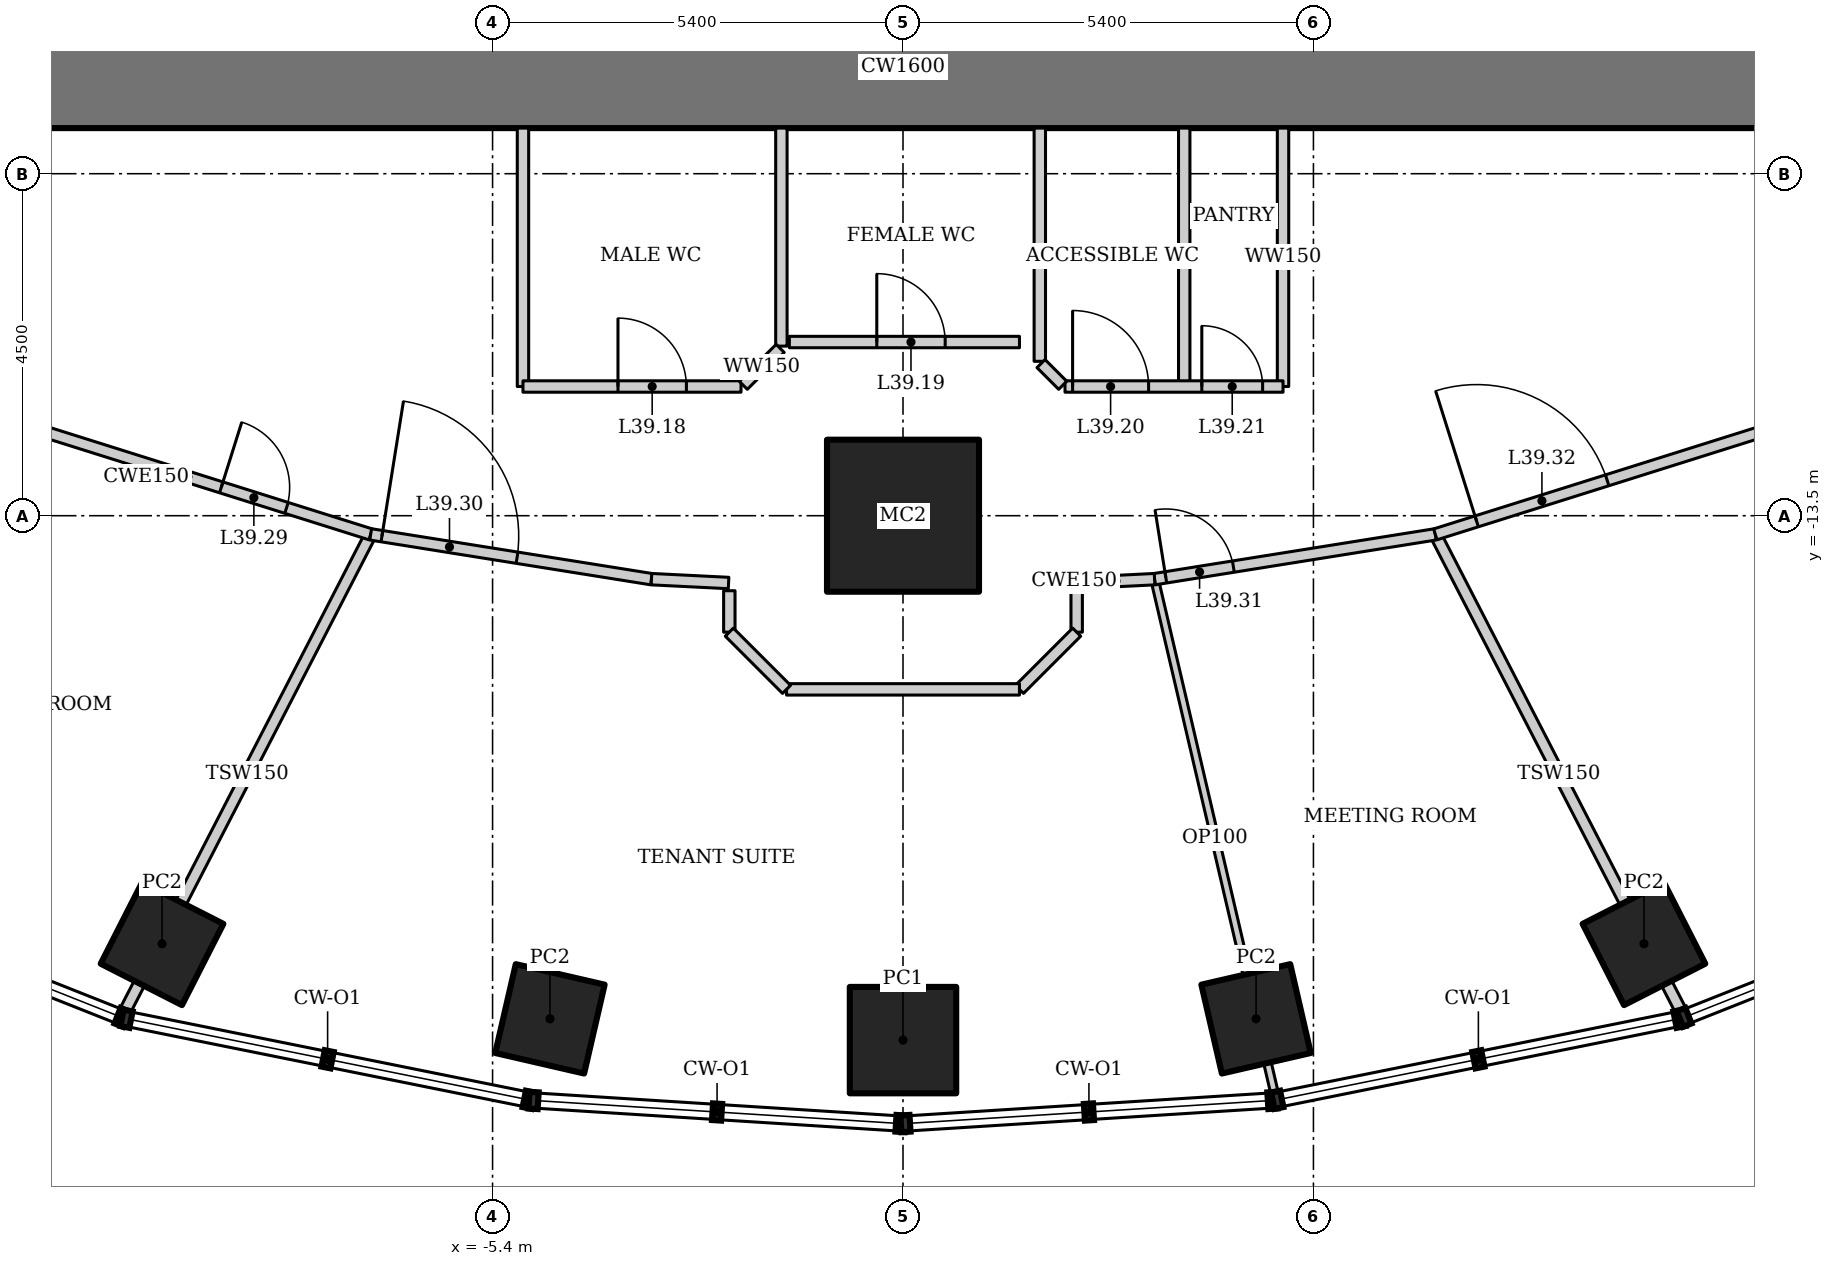
"""IFC4 building model, lengths in metres.
Left out: names, types, materials, properties, quantities, classifications, styles, units other than length and angle.
Written with IfcOpenShell. Run it as: python <this file> out.ifc"""

import sys

from ifc_helpers import new_model, si_unit, direction, frame, frame_2d, origin, origin_2d, place, context, subcontext, project, spatial, rectangle, hollow_rectangle, extrude, element, fill, save


model = new_model("IFC4")
c1 = context("Model", 3, precision=1e-05, world=origin(), true_north=direction((0.0, 1.0)))
c2 = subcontext(c1, "Body", "Model", "MODEL_VIEW")
j1 = project(units=[si_unit("LENGTHUNIT", "METRE"), si_unit("PLANEANGLEUNIT", "RADIAN")], contexts=[c1])
p1 = place(None, origin())
s1 = spatial("IfcSite", under=j1, at=p1, CompositionType="ELEMENT")
p2 = place(p1, origin())
s2 = spatial("IfcBuilding", under=s1, at=p2, CompositionType="ELEMENT")
p3 = place(p2, frame((0.0, 0.0, 167.8)))
s3 = spatial("IfcBuildingStorey", under=s2, at=p3, CompositionType="ELEMENT", Elevation=167.8)
p4 = place(p3, frame((0.0, -13.5, 0.0), z_axis=(0.0, 0.0, 1.0), x_axis=(1.0, 0.0, 0.0)))
e1 = element("IfcColumn", 1, at=p4, inside=s3, PredefinedType="COLUMN", context=c2, shape_type="SweptSolid", body=[
    extrude(hollow_rectangle(XDim=2.0, YDim=2.0, WallThickness=0.17, at=origin_2d()), origin(), (0.0, 0.0, 1.0), 4.2),
])
for number, where, z_axis, x_axis in (
    (2, (-9.749, -19.133, 0.0), (0.0, 0.0, 1.0), (0.454, 0.891, 0.0)),
    (3, (-4.645, -20.12, 0.0), (0.0, 0.0, 1.0), (0.225, 0.974, 0.0)),
):
    element("IfcColumn", number, at=place(p3, frame(where, z_axis=z_axis, x_axis=x_axis)), inside=s3, PredefinedType="COLUMN", context=c2, shape_type="SweptSolid", body=[
        extrude(hollow_rectangle(XDim=1.2, YDim=1.2, WallThickness=0.1, at=origin_2d()), origin(), (0.0, 0.0, 1.0), 4.2),
    ])
p5 = place(p3, frame((0.0, -20.4, 0.0), z_axis=(0.0, 0.0, 1.0), x_axis=(1.0, 0.0, 0.0)))
e4 = element("IfcColumn", 4, at=p5, inside=s3, PredefinedType="COLUMN", context=c2, shape_type="SweptSolid", body=[
    extrude(hollow_rectangle(XDim=1.4, YDim=1.4, WallThickness=0.1, at=origin_2d()), origin(), (0.0, 0.0, 1.0), 4.2),
])
for number, where, z_axis, x_axis in (
    (5, (4.645, -20.12, 0.0), (0.0, 0.0, 1.0), (0.974, 0.225, 0.0)),
    (6, (9.749, -19.133, 0.0), (0.0, 0.0, 1.0), (0.891, 0.454, 0.0)),
):
    element("IfcColumn", number, at=place(p3, frame(where, z_axis=z_axis, x_axis=x_axis)), inside=s3, PredefinedType="COLUMN", context=c2, shape_type="SweptSolid", body=[
        extrude(hollow_rectangle(XDim=1.2, YDim=1.2, WallThickness=0.1, at=origin_2d()), origin(), (0.0, 0.0, 1.0), 4.2),
    ])
p6 = place(p3, frame((-12.2, -7.6, 0.0), z_axis=(0.0, 0.0, 1.0), x_axis=(1.0, 0.0, 0.0)))
e7 = element("IfcWall", 7, at=p6, inside=s3, PredefinedType="SHEAR", context=c2, shape_type="SweptSolid", body=[
    extrude(rectangle(XDim=24.4, YDim=1.6, at=frame_2d((12.2, 0.0))), origin(), (0.0, 0.0, 1.0), 4.2),
])
p7 = place(p3, frame((-10.253, -20.052, 0.0), z_axis=(0.0, 0.0, 1.0), x_axis=(0.458082677592, 0.888909590729, 0.0)))
e8 = element("IfcWall", 8, at=p7, inside=s3, PredefinedType="PARTITIONING", context=c2, shape_type="SweptSolid", body=[
    extrude(rectangle(XDim=7.094, YDim=0.15, at=frame_2d((3.547, 0.0))), origin(), (0.0, 0.0, 1.0), 3.349),
])
p8 = place(p3, frame((4.897, -21.135, 0.0), z_axis=(0.0, 0.0, 1.0), x_axis=(-0.22733572198, 0.973816445493, 0.0)))
e9 = element("IfcWall", 9, at=p8, inside=s3, PredefinedType="PARTITIONING", context=c2, shape_type="SweptSolid", body=[
    extrude(rectangle(XDim=6.983, YDim=0.1, at=frame_2d((3.491, 0.0))), origin(), (0.0, 0.0, 1.0), 3.293),
])
p9 = place(p3, frame((10.253, -20.052, 0.0), z_axis=(0.0, 0.0, 1.0), x_axis=(-0.458082677592, 0.888909590729, 0.0)))
e10 = element("IfcWall", 10, at=p9, inside=s3, PredefinedType="PARTITIONING", context=c2, shape_type="SweptSolid", body=[
    extrude(rectangle(XDim=7.094, YDim=0.15, at=frame_2d((3.547, 0.0))), origin(), (0.0, 0.0, 1.0), 3.349),
])
p10 = place(p3, frame((-11.813, -12.232, 0.0), z_axis=(0.0, 0.0, 1.0), x_axis=(0.953893934057, -0.300143903101, 0.0)))
e11 = element("IfcWall", 11, at=p10, inside=s3, PredefinedType="PARTITIONING", context=c2, shape_type="SweptSolid", body=[
    extrude(rectangle(XDim=5.042, YDim=0.15, at=frame_2d((2.521, 0.0))), origin(), (0.0, 0.0, 1.0), 4.05),
])
p11 = place(p10, frame((2.98, 0.0, 0.0)))
e12 = element("IfcOpeningElement", 12, at=p11, cuts=e11, PredefinedType="OPENING", context=c2, shape_type="SweptSolid", body=[
    extrude(rectangle(XDim=0.9, YDim=2.1, at=frame_2d((0.45, 1.05))), frame((0.0, 0.085, 0.0), z_axis=(0.0, -1.0, 0.0), x_axis=(1.0, 0.0, 0.0)), (0.0, 0.0, 1.0), 0.17),
])
p12 = place(p3, frame((-7.004, -13.746, 0.0), z_axis=(0.0, 0.0, 1.0), x_axis=(0.987511396594, -0.157547585181, 0.0)))
e13 = element("IfcWall", 13, at=p12, inside=s3, PredefinedType="PARTITIONING", context=c2, shape_type="SweptSolid", body=[
    extrude(rectangle(XDim=3.741, YDim=0.15, at=frame_2d((1.87, 0.0))), origin(), (0.0, 0.0, 1.0), 4.05),
])
p13 = place(p12, frame((0.15, 0.0, 0.0)))
e14 = element("IfcOpeningElement", 14, at=p13, cuts=e13, PredefinedType="OPENING", context=c2, shape_type="SweptSolid", body=[
    extrude(rectangle(XDim=1.8, YDim=2.1, at=frame_2d((0.9, 1.05))), frame((0.0, 0.085, 0.0), z_axis=(0.0, -1.0, 0.0), x_axis=(1.0, 0.0, 0.0)), (0.0, 0.0, 1.0), 0.17),
])
p14 = place(p3, frame((3.31, -14.335, 0.0), z_axis=(0.0, 0.0, 1.0), x_axis=(0.987511396594, 0.157547585181, 0.0)))
e15 = element("IfcWall", 15, at=p14, inside=s3, PredefinedType="PARTITIONING", context=c2, shape_type="SweptSolid", body=[
    extrude(rectangle(XDim=3.741, YDim=0.15, at=frame_2d((1.87, 0.0))), origin(), (0.0, 0.0, 1.0), 4.05),
])
p15 = place(p14, frame((0.15, 0.0, 0.0)))
e16 = element("IfcOpeningElement", 16, at=p15, cuts=e15, PredefinedType="OPENING", context=c2, shape_type="SweptSolid", body=[
    extrude(rectangle(XDim=0.9, YDim=2.1, at=frame_2d((0.45, 1.05))), frame((0.0, 0.085, 0.0), z_axis=(0.0, -1.0, 0.0), x_axis=(1.0, 0.0, 0.0)), (0.0, 0.0, 1.0), 0.17),
])
p16 = place(p3, frame((7.004, -13.746, 0.0), z_axis=(0.0, 0.0, 1.0), x_axis=(0.953893934057, 0.300143903101, 0.0)))
e17 = element("IfcWall", 17, at=p16, inside=s3, PredefinedType="PARTITIONING", context=c2, shape_type="SweptSolid", body=[
    extrude(rectangle(XDim=5.042, YDim=0.15, at=frame_2d((2.521, 0.0))), origin(), (0.0, 0.0, 1.0), 4.05),
])
p17 = place(p16, frame((0.57, 0.0, 0.0)))
e18 = element("IfcOpeningElement", 18, at=p17, cuts=e17, PredefinedType="OPENING", context=c2, shape_type="SweptSolid", body=[
    extrude(rectangle(XDim=1.8, YDim=2.1, at=frame_2d((0.9, 1.05))), frame((0.0, 0.085, 0.0), z_axis=(0.0, -1.0, 0.0), x_axis=(1.0, 0.0, 0.0)), (0.0, 0.0, 1.0), 0.17),
])
for number, where, z_axis, x_axis in (
    (19, (-5.0, -8.4, 0.0), (0.0, 0.0, 1.0), (0.0, -1.0, 0.0)),
    (20, (5.0, -8.4, 0.0), (0.0, 0.0, 1.0), (0.0, -1.0, 0.0)),
    (21, (3.7, -8.4, 0.0), (0.0, 0.0, 1.0), (0.0, -1.0, 0.0)),
):
    element("IfcWall", number, at=place(p3, frame(where, z_axis=z_axis, x_axis=x_axis)), inside=s3, PredefinedType="SOLIDWALL", context=c2, shape_type="SweptSolid", body=[
        extrude(rectangle(XDim=3.4, YDim=0.15, at=frame_2d((1.7, 0.0))), origin(), (0.0, 0.0, 1.0), 4.05),
    ])
for number, where, z_axis, x_axis in (
    (22, (-3.31, -14.335, 0.0), (0.0, 0.0, 1.0), (0.999, -0.05, 0.0)),
    (23, (2.295, -14.385, 0.0), (0.0, 0.0, 1.0), (0.999, 0.05, 0.0)),
):
    element("IfcWall", number, at=place(p3, frame(where, z_axis=z_axis, x_axis=x_axis)), inside=s3, PredefinedType="PARTITIONING", context=c2, shape_type="SweptSolid", body=[
        extrude(rectangle(XDim=1.016, YDim=0.15, at=frame_2d((0.508, 0.0))), origin(), (0.0, 0.0, 1.0), 4.05),
    ])
p18 = place(p3, frame((-5.0, -11.8, 0.0), z_axis=(0.0, 0.0, 1.0), x_axis=(1.0, 0.0, 0.0)))
e24 = element("IfcWall", 24, at=p18, inside=s3, PredefinedType="SOLIDWALL", context=c2, shape_type="SweptSolid", body=[
    extrude(rectangle(XDim=2.869, YDim=0.15, at=frame_2d((1.434, 0.0))), origin(), (0.0, 0.0, 1.0), 4.05),
])
p19 = place(p18, frame((1.25, 0.0, 0.0)))
e25 = element("IfcOpeningElement", 25, at=p19, cuts=e24, PredefinedType="OPENING", context=c2, shape_type="SweptSolid", body=[
    extrude(rectangle(XDim=0.9, YDim=2.1, at=frame_2d((0.45, 1.05))), frame((0.0, 0.085, 0.0), z_axis=(0.0, -1.0, 0.0), x_axis=(1.0, 0.0, 0.0)), (0.0, 0.0, 1.0), 0.17),
])
p20 = place(p3, frame((2.131, -11.8, 0.0), z_axis=(0.0, 0.0, 1.0), x_axis=(1.0, 0.0, 0.0)))
e26 = element("IfcWall", 26, at=p20, inside=s3, PredefinedType="SOLIDWALL", context=c2, shape_type="SweptSolid", body=[
    extrude(rectangle(XDim=2.869, YDim=0.15, at=frame_2d((1.434, 0.0))), origin(), (0.0, 0.0, 1.0), 4.05),
])
p21 = place(p20, frame((0.1, 0.0, 0.0)))
e27 = element("IfcOpeningElement", 27, at=p21, cuts=e26, PredefinedType="OPENING", context=c2, shape_type="SweptSolid", body=[
    extrude(rectangle(XDim=1.0, YDim=2.1, at=frame_2d((0.5, 1.05))), frame((0.0, 0.085, 0.0), z_axis=(0.0, -1.0, 0.0), x_axis=(1.0, 0.0, 0.0)), (0.0, 0.0, 1.0), 0.17),
])
p22 = place(p20, frame((1.8, 0.0, 0.0)))
e28 = element("IfcOpeningElement", 28, at=p22, cuts=e26, PredefinedType="OPENING", context=c2, shape_type="SweptSolid", body=[
    extrude(rectangle(XDim=0.8, YDim=2.1, at=frame_2d((0.4, 1.05))), frame((0.0, 0.085, 0.0), z_axis=(0.0, -1.0, 0.0), x_axis=(1.0, 0.0, 0.0)), (0.0, 0.0, 1.0), 0.17),
])
p23 = place(p3, frame((-1.6, -8.4, 0.0), z_axis=(0.0, 0.0, 1.0), x_axis=(0.0, -1.0, 0.0)))
e29 = element("IfcWall", 29, at=p23, inside=s3, PredefinedType="SOLIDWALL", context=c2, shape_type="SweptSolid", body=[
    extrude(rectangle(XDim=2.869, YDim=0.15, at=frame_2d((1.434, 0.0))), origin(), (0.0, 0.0, 1.0), 4.05),
])
p24 = place(p3, frame((1.8, -8.4, 0.0), z_axis=(0.0, 0.0, 1.0), x_axis=(0.0, -1.0, 0.0)))
e30 = element("IfcWall", 30, at=p24, inside=s3, PredefinedType="SOLIDWALL", context=c2, shape_type="SweptSolid", body=[
    extrude(rectangle(XDim=3.069, YDim=0.15, at=frame_2d((1.534, 0.0))), origin(), (0.0, 0.0, 1.0), 4.05),
])
p25 = place(p3, frame((-2.101, -11.784, 0.0), z_axis=(0.0, 0.0, 1.0), x_axis=(0.706928959799, 0.707284557867, 0.0)))
e31 = element("IfcWall", 31, at=p25, inside=s3, PredefinedType="SOLIDWALL", context=c2, shape_type="SweptSolid", body=[
    extrude(rectangle(XDim=0.687, YDim=0.15, at=frame_2d((0.343, 0.0))), origin(), (0.0, 0.0, 1.0), 4.05),
])
p26 = place(p3, frame((-1.495, -11.215, 0.0), z_axis=(0.0, 0.0, 1.0), x_axis=(1.0, 0.0, 0.0)))
e32 = element("IfcWall", 32, at=p26, inside=s3, PredefinedType="SOLIDWALL", context=c2, shape_type="SweptSolid", body=[
    extrude(rectangle(XDim=3.027, YDim=0.15, at=frame_2d((1.514, 0.0))), origin(), (0.0, 0.0, 1.0), 4.05),
])
p27 = place(p26, frame((1.15, 0.0, 0.0)))
e33 = element("IfcOpeningElement", 33, at=p27, cuts=e32, PredefinedType="OPENING", context=c2, shape_type="SweptSolid", body=[
    extrude(rectangle(XDim=0.9, YDim=2.1, at=frame_2d((0.45, 1.05))), frame((0.0, 0.085, 0.0), z_axis=(0.0, -1.0, 0.0), x_axis=(1.0, 0.0, 0.0)), (0.0, 0.0, 1.0), 0.17),
])
p28 = place(p3, frame((1.816, -11.499, 0.0), z_axis=(0.0, 0.0, 1.0), x_axis=(0.706804405012, -0.707409028113, 0.0)))
e34 = element("IfcWall", 34, at=p28, inside=s3, PredefinedType="SOLIDWALL", context=c2, shape_type="SweptSolid", body=[
    extrude(rectangle(XDim=0.404, YDim=0.15, at=frame_2d((0.202, 0.0))), origin(), (0.0, 0.0, 1.0), 4.05),
])
for number, where, z_axis, x_axis in (
    (35, (-2.285, -15.032, 0.0), (0.0, 0.0, 1.0), (0.0, 1.0, 0.0)),
    (36, (2.285, -14.487, 0.0), (0.0, 0.0, 1.0), (0.0, -1.0, 0.0)),
):
    element("IfcWall", number, at=place(p3, frame(where, z_axis=z_axis, x_axis=x_axis)), inside=s3, PredefinedType="PARTITIONING", context=c2, shape_type="SweptSolid", body=[
        extrude(rectangle(XDim=0.545, YDim=0.15, at=frame_2d((0.272, 0.0))), origin(), (0.0, 0.0, 1.0), 4.05),
    ])
p29 = place(p3, frame((2.285, -15.032, 0.0), z_axis=(0.0, 0.0, 1.0), x_axis=(-0.707106781187, -0.707106781187, 0.0)))
e37 = element("IfcWall", 37, at=p29, inside=s3, PredefinedType="PARTITIONING", context=c2, shape_type="SweptSolid", body=[
    extrude(rectangle(XDim=1.064, YDim=0.15, at=frame_2d((0.532, 0.0))), origin(), (0.0, 0.0, 1.0), 4.05),
])
p30 = place(p3, frame((1.532, -15.785, 0.0), z_axis=(0.0, 0.0, 1.0), x_axis=(-1.0, 0.0, 0.0)))
e38 = element("IfcWall", 38, at=p30, inside=s3, PredefinedType="PARTITIONING", context=c2, shape_type="SweptSolid", body=[
    extrude(rectangle(XDim=3.064, YDim=0.15, at=frame_2d((1.532, 0.0))), origin(), (0.0, 0.0, 1.0), 4.05),
])
p31 = place(p3, frame((-1.532, -15.785, 0.0), z_axis=(0.0, 0.0, 1.0), x_axis=(-0.707106781187, 0.707106781187, 0.0)))
e39 = element("IfcWall", 39, at=p31, inside=s3, PredefinedType="PARTITIONING", context=c2, shape_type="SweptSolid", body=[
    extrude(rectangle(XDim=1.064, YDim=0.15, at=frame_2d((0.532, 0.0))), origin(), (0.0, 0.0, 1.0), 4.05),
])
p32 = place(p19, origin())
e40 = element("IfcDoor", 40, at=p32, inside=s3, OperationType="SINGLE_SWING_LEFT", PredefinedType="DOOR", context=c2, shape_type="SweptSolid", body=[
    extrude(rectangle(XDim=0.9, YDim=2.1, at=frame_2d((0.45, 1.05))), frame((0.0, 0.025, 0.0), z_axis=(0.0, -1.0, 0.0), x_axis=(1.0, 0.0, 0.0)), (0.0, 0.0, 1.0), 0.05),
])
fill(e25, e40)
p33 = place(p27, origin())
e41 = element("IfcDoor", 41, at=p33, inside=s3, OperationType="SINGLE_SWING_LEFT", PredefinedType="DOOR", context=c2, shape_type="SweptSolid", body=[
    extrude(rectangle(XDim=0.9, YDim=2.1, at=frame_2d((0.45, 1.05))), frame((0.0, 0.025, 0.0), z_axis=(0.0, -1.0, 0.0), x_axis=(1.0, 0.0, 0.0)), (0.0, 0.0, 1.0), 0.05),
])
fill(e33, e41)
p34 = place(p21, origin())
e42 = element("IfcDoor", 42, at=p34, inside=s3, OperationType="SINGLE_SWING_LEFT", PredefinedType="DOOR", context=c2, shape_type="SweptSolid", body=[
    extrude(rectangle(XDim=1.0, YDim=2.1, at=frame_2d((0.5, 1.05))), frame((0.0, 0.025, 0.0), z_axis=(0.0, -1.0, 0.0), x_axis=(1.0, 0.0, 0.0)), (0.0, 0.0, 1.0), 0.05),
])
fill(e27, e42)
p35 = place(p22, origin())
e43 = element("IfcDoor", 43, at=p35, inside=s3, OperationType="SINGLE_SWING_LEFT", PredefinedType="DOOR", context=c2, shape_type="SweptSolid", body=[
    extrude(rectangle(XDim=0.8, YDim=2.1, at=frame_2d((0.4, 1.05))), frame((0.0, 0.025, 0.0), z_axis=(0.0, -1.0, 0.0), x_axis=(1.0, 0.0, 0.0)), (0.0, 0.0, 1.0), 0.05),
])
fill(e28, e43)
p36 = place(p11, origin())
e44 = element("IfcDoor", 44, at=p36, inside=s3, OperationType="SINGLE_SWING_LEFT", PredefinedType="DOOR", context=c2, shape_type="SweptSolid", body=[
    extrude(rectangle(XDim=0.9, YDim=2.1, at=frame_2d((0.45, 1.05))), frame((0.0, 0.025, 0.0), z_axis=(0.0, -1.0, 0.0), x_axis=(1.0, 0.0, 0.0)), (0.0, 0.0, 1.0), 0.05),
])
fill(e12, e44)
p37 = place(p13, origin())
e45 = element("IfcDoor", 45, at=p37, inside=s3, OperationType="DOUBLE_DOOR_DOUBLE_SWING", PredefinedType="DOOR", context=c2, shape_type="SweptSolid", body=[
    extrude(rectangle(XDim=1.8, YDim=2.1, at=frame_2d((0.9, 1.05))), frame((0.0, 0.025, 0.0), z_axis=(0.0, -1.0, 0.0), x_axis=(1.0, 0.0, 0.0)), (0.0, 0.0, 1.0), 0.05),
])
fill(e14, e45)
p38 = place(p15, origin())
e46 = element("IfcDoor", 46, at=p38, inside=s3, OperationType="SINGLE_SWING_LEFT", PredefinedType="DOOR", context=c2, shape_type="SweptSolid", body=[
    extrude(rectangle(XDim=0.9, YDim=2.1, at=frame_2d((0.45, 1.05))), frame((0.0, 0.025, 0.0), z_axis=(0.0, -1.0, 0.0), x_axis=(1.0, 0.0, 0.0)), (0.0, 0.0, 1.0), 0.05),
])
fill(e16, e46)
p39 = place(p17, origin())
e47 = element("IfcDoor", 47, at=p39, inside=s3, OperationType="DOUBLE_DOOR_DOUBLE_SWING", PredefinedType="DOOR", context=c2, shape_type="SweptSolid", body=[
    extrude(rectangle(XDim=1.8, YDim=2.1, at=frame_2d((0.9, 1.05))), frame((0.0, 0.025, 0.0), z_axis=(0.0, -1.0, 0.0), x_axis=(1.0, 0.0, 0.0)), (0.0, 0.0, 1.0), 0.05),
])
fill(e18, e47)
save(model, sys.argv[1])
